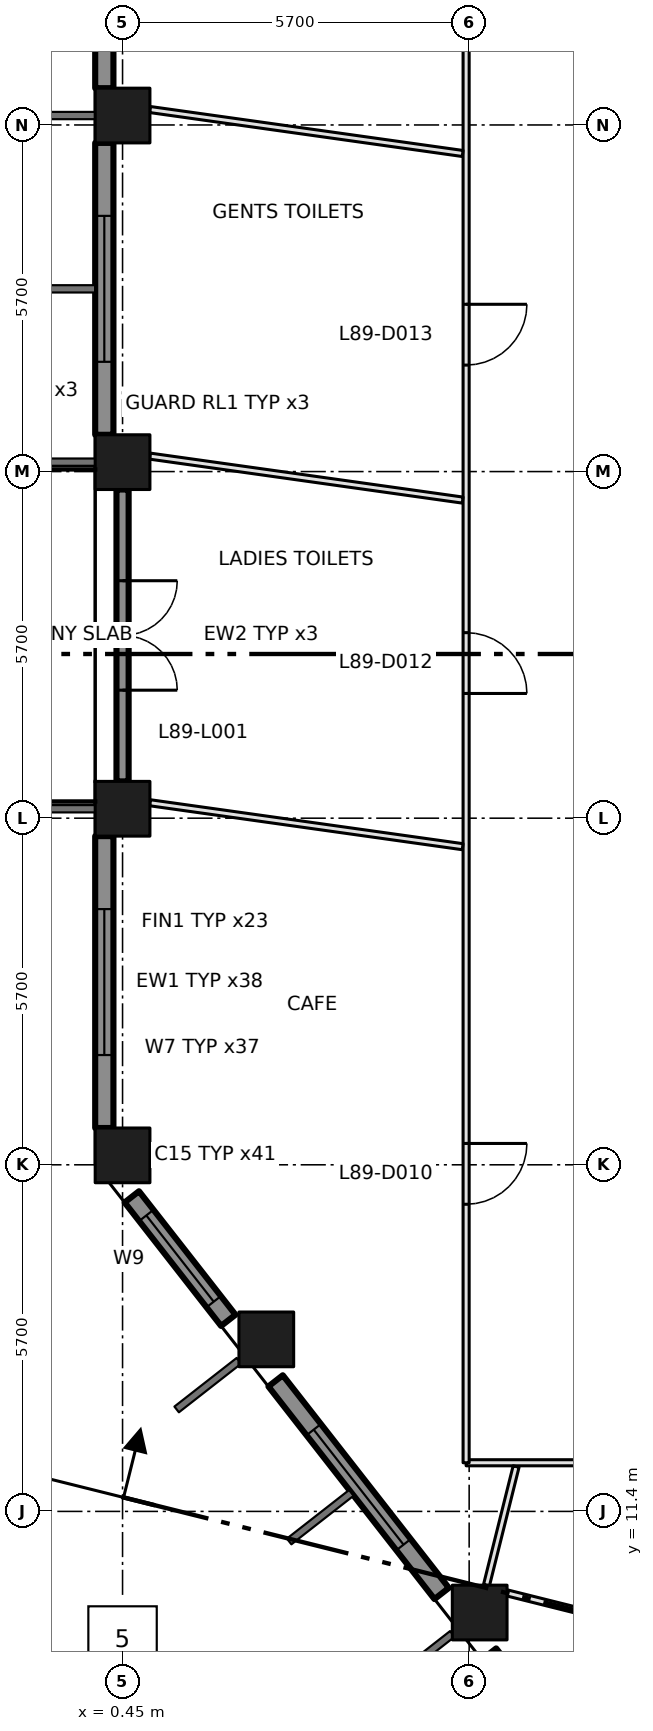
"""IFC4 building model, lengths in metres.
Left out: names, types, materials, properties, quantities, classifications, styles, units other than length and angle.
Written with IfcOpenShell. Run it as: python <this file> out.ifc"""

import sys

from ifc_helpers import new_model, si_unit, direction, frame, frame_2d, origin, origin_2d, place, context, subcontext, project, spatial, rectangle, extrude, element, fill, save


model = new_model("IFC4")
c1 = context("Model", 3, precision=1e-05, world=origin(), true_north=direction((0.0, 1.0)))
c2 = subcontext(c1, "Body", "Model", "MODEL_VIEW")
j1 = project(units=[si_unit("LENGTHUNIT", "METRE"), si_unit("PLANEANGLEUNIT", "RADIAN")], contexts=[c1])
p1 = place(None, origin())
s1 = spatial("IfcSite", under=j1, at=p1, CompositionType="ELEMENT")
p2 = place(p1, origin())
s2 = spatial("IfcBuilding", under=s1, at=p2, CompositionType="ELEMENT")
p3 = place(p2, frame((0.0, 0.0, 387.6)))
s3 = spatial("IfcBuildingStorey", under=s2, at=p3, CompositionType="ELEMENT", Elevation=387.6)
for number, where, z_axis, x_axis in (
    (1, (0.45, 17.255, 0.0), (0.0, 0.0, 1.0), (1.0, 0.0, 0.0)),
    (2, (0.45, 22.955, 0.0), (0.0, 0.0, 1.0), (1.0, 0.0, 0.0)),
    (3, (0.45, 28.655, 0.0), (0.0, 0.0, 1.0), (1.0, 0.0, 0.0)),
    (4, (0.45, 34.355, 0.0), (0.0, 0.0, 1.0), (1.0, 0.0, 0.0)),
    (5, (6.323, 9.737, 0.0), (0.0, 0.0, 1.0), (1.0, 0.0, 0.0)),
    (6, (2.814, 14.229, 0.0), (0.0, 0.0, 1.0), (1.0, 0.0, 0.0)),
):
    element("IfcColumn", number, at=place(p3, frame(where, z_axis=z_axis, x_axis=x_axis)), inside=s3, PredefinedType="COLUMN", context=c2, shape_type="SweptSolid", body=[
        extrude(rectangle(XDim=0.9, YDim=0.9, at=origin_2d()), origin(), (0.0, 0.0, 1.0), 4.2),
    ])
p4 = place(p3, frame((0.15, 39.605, 0.0), z_axis=(0.0, 0.0, 1.0), x_axis=(0.0, -1.0, 0.0)))
e7 = element("IfcWall", 7, at=p4, inside=s3, PredefinedType="SOLIDWALL", context=c2, shape_type="SweptSolid", body=[
    extrude(rectangle(XDim=4.8, YDim=0.3, at=frame_2d((2.4, 0.0))), origin(), (0.0, 0.0, 1.0), 3.2),
])
p5 = place(p4, frame((1.2, 0.0, 0.8)))
e8 = element("IfcOpeningElement", 8, at=p5, cuts=e7, PredefinedType="OPENING", context=c2, shape_type="SweptSolid", body=[
    extrude(rectangle(XDim=2.4, YDim=2.1, at=frame_2d((1.2, 1.05))), frame((0.0, 0.16, 0.0), z_axis=(0.0, -1.0, 0.0), x_axis=(1.0, 0.0, 0.0)), (0.0, 0.0, 1.0), 0.32),
])
p6 = place(p3, frame((0.15, 33.905, 0.0), z_axis=(0.0, 0.0, 1.0), x_axis=(0.0, -1.0, 0.0)))
e9 = element("IfcWall", 9, at=p6, inside=s3, PredefinedType="SOLIDWALL", context=c2, shape_type="SweptSolid", body=[
    extrude(rectangle(XDim=4.8, YDim=0.3, at=frame_2d((2.4, 0.0))), origin(), (0.0, 0.0, 1.0), 3.2),
])
p7 = place(p6, frame((1.2, 0.0, 0.8)))
e10 = element("IfcOpeningElement", 10, at=p7, cuts=e9, PredefinedType="OPENING", context=c2, shape_type="SweptSolid", body=[
    extrude(rectangle(XDim=2.4, YDim=2.1, at=frame_2d((1.2, 1.05))), frame((0.0, 0.16, 0.0), z_axis=(0.0, -1.0, 0.0), x_axis=(1.0, 0.0, 0.0)), (0.0, 0.0, 1.0), 0.32),
])
p8 = place(p3, frame((0.45, 28.205, 0.0), z_axis=(0.0, 0.0, 1.0), x_axis=(0.0, -1.0, 0.0)))
e11 = element("IfcWall", 11, at=p8, inside=s3, PredefinedType="SOLIDWALL", context=c2, shape_type="SweptSolid", body=[
    extrude(rectangle(XDim=4.8, YDim=0.2, at=frame_2d((2.4, 0.0))), origin(), (0.0, 0.0, 1.0), 3.2),
])
p9 = place(p8, frame((1.5, 0.0, 0.0)))
e12 = element("IfcOpeningElement", 12, at=p9, cuts=e11, PredefinedType="OPENING", context=c2, shape_type="SweptSolid", body=[
    extrude(rectangle(XDim=1.8, YDim=2.9, at=frame_2d((0.9, 1.45))), frame((0.0, 0.11, 0.0), z_axis=(0.0, -1.0, 0.0), x_axis=(1.0, 0.0, 0.0)), (0.0, 0.0, 1.0), 0.22),
])
p10 = place(p3, frame((-0.88, 28.485, 0.0), z_axis=(0.0, 0.0, 1.0), x_axis=(0.0, -1.0, 0.0)))
e13 = element("IfcWall", 13, at=p10, inside=s3, PredefinedType="SOLIDWALL", context=c2, shape_type="SweptSolid", body=[
    extrude(rectangle(XDim=5.36, YDim=0.4, at=frame_2d((2.68, 0.0))), origin(), (0.0, 0.0, 1.0), 0.3),
])
p11 = place(p3, frame((0.15, 22.505, 0.0), z_axis=(0.0, 0.0, 1.0), x_axis=(0.0, -1.0, 0.0)))
e14 = element("IfcWall", 14, at=p11, inside=s3, PredefinedType="SOLIDWALL", context=c2, shape_type="SweptSolid", body=[
    extrude(rectangle(XDim=4.8, YDim=0.3, at=frame_2d((2.4, 0.0))), origin(), (0.0, 0.0, 1.0), 3.2),
])
p12 = place(p11, frame((1.2, 0.0, 0.8)))
e15 = element("IfcOpeningElement", 15, at=p12, cuts=e14, PredefinedType="OPENING", context=c2, shape_type="SweptSolid", body=[
    extrude(rectangle(XDim=2.4, YDim=2.1, at=frame_2d((1.2, 1.05))), frame((0.0, 0.16, 0.0), z_axis=(0.0, -1.0, 0.0), x_axis=(1.0, 0.0, 0.0)), (0.0, 0.0, 1.0), 0.32),
])
p13 = place(p3, frame((0.602, 16.573, 0.0), z_axis=(0.0, 0.0, 1.0), x_axis=(0.61568999437, -0.787988471256, 0.0)))
e16 = element("IfcWall", 16, at=p13, inside=s3, PredefinedType="SOLIDWALL", context=c2, shape_type="SweptSolid", body=[
    extrude(rectangle(XDim=2.577, YDim=0.3, at=frame_2d((1.289, 0.0))), origin(), (0.0, 0.0, 1.0), 3.2),
])
p14 = place(p13, frame((0.388, 0.0, 0.8)))
e17 = element("IfcOpeningElement", 17, at=p14, cuts=e16, PredefinedType="OPENING", context=c2, shape_type="SweptSolid", body=[
    extrude(rectangle(XDim=1.8, YDim=2.1, at=frame_2d((0.9, 1.05))), frame((0.0, 0.16, 0.0), z_axis=(0.0, -1.0, 0.0), x_axis=(1.0, 0.0, 0.0)), (0.0, 0.0, 1.0), 0.32),
])
p15 = place(p3, frame((2.967, 13.547, 0.0), z_axis=(0.0, 0.0, 1.0), x_axis=(0.615486001463, -0.788147817356, 0.0)))
e18 = element("IfcWall", 18, at=p15, inside=s3, PredefinedType="SOLIDWALL", context=c2, shape_type="SweptSolid", body=[
    extrude(rectangle(XDim=4.437, YDim=0.3, at=frame_2d((2.219, 0.0))), origin(), (0.0, 0.0, 1.0), 3.2),
])
p16 = place(p15, frame((1.018, 0.0, 0.8)))
e19 = element("IfcOpeningElement", 19, at=p16, cuts=e18, PredefinedType="OPENING", context=c2, shape_type="SweptSolid", body=[
    extrude(rectangle(XDim=2.4, YDim=2.1, at=frame_2d((1.2, 1.05))), frame((0.0, 0.16, 0.0), z_axis=(0.0, -1.0, 0.0), x_axis=(1.0, 0.0, 0.0)), (0.0, 0.0, 1.0), 0.32),
])
p17 = place(p3, frame((6.476, 9.055, 0.0), z_axis=(0.0, 0.0, 1.0), x_axis=(0.615649380255, -0.788020203162, 0.0)))
e20 = element("IfcWall", 20, at=p17, inside=s3, PredefinedType="SOLIDWALL", context=c2, shape_type="SweptSolid", body=[
    extrude(rectangle(XDim=4.438, YDim=0.3, at=frame_2d((2.219, 0.0))), origin(), (0.0, 0.0, 1.0), 3.2),
])
p18 = place(p17, frame((1.019, 0.0, 0.8)))
e21 = element("IfcOpeningElement", 21, at=p18, cuts=e20, PredefinedType="OPENING", context=c2, shape_type="SweptSolid", body=[
    extrude(rectangle(XDim=2.4, YDim=2.1, at=frame_2d((1.2, 1.05))), frame((0.0, 0.16, 0.0), z_axis=(0.0, -1.0, 0.0), x_axis=(1.0, 0.0, 0.0)), (0.0, 0.0, 1.0), 0.32),
])
p19 = place(p3, frame((6.1, 12.2, 0.0), z_axis=(0.0, 0.0, 1.0), x_axis=(1.0, 0.0, 0.0)))
e22 = element("IfcWall", 22, at=p19, inside=s3, PredefinedType="PARTITIONING", context=c2, shape_type="SweptSolid", body=[
    extrude(rectangle(XDim=3.8, YDim=0.1, at=frame_2d((1.9, 0.0))), origin(), (0.0, 0.0, 1.0), 3.9),
])
p20 = place(p3, frame((6.1, 38.9, 0.0), z_axis=(0.0, 0.0, 1.0), x_axis=(0.0, -1.0, 0.0)))
e23 = element("IfcWall", 23, at=p20, inside=s3, PredefinedType="PARTITIONING", context=c2, shape_type="SweptSolid", body=[
    extrude(rectangle(XDim=26.7, YDim=0.1, at=frame_2d((13.35, 0.0))), origin(), (0.0, 0.0, 1.0), 3.9),
])
p21 = place(p20, frame((21.449, 0.0, 0.0)))
e24 = element("IfcOpeningElement", 24, at=p21, cuts=e23, PredefinedType="OPENING", context=c2, shape_type="SweptSolid", body=[
    extrude(rectangle(XDim=1.0, YDim=2.1, at=frame_2d((0.5, 1.05))), frame((0.0, 0.06, 0.0), z_axis=(0.0, -1.0, 0.0), x_axis=(1.0, 0.0, 0.0)), (0.0, 0.0, 1.0), 0.12),
])
p22 = place(p20, frame((13.049, 0.0, 0.0)))
e25 = element("IfcOpeningElement", 25, at=p22, cuts=e23, PredefinedType="OPENING", context=c2, shape_type="SweptSolid", body=[
    extrude(rectangle(XDim=1.0, YDim=2.1, at=frame_2d((0.5, 1.05))), frame((0.0, 0.06, 0.0), z_axis=(0.0, -1.0, 0.0), x_axis=(1.0, 0.0, 0.0)), (0.0, 0.0, 1.0), 0.12),
])
p23 = place(p20, frame((7.649, 0.0, 0.0)))
e26 = element("IfcOpeningElement", 26, at=p23, cuts=e23, PredefinedType="OPENING", context=c2, shape_type="SweptSolid", body=[
    extrude(rectangle(XDim=1.0, YDim=2.1, at=frame_2d((0.5, 1.05))), frame((0.0, 0.06, 0.0), z_axis=(0.0, -1.0, 0.0), x_axis=(1.0, 0.0, 0.0)), (0.0, 0.0, 1.0), 0.12),
])
p24 = place(p20, frame((2.08, 0.0, 0.0)))
e27 = element("IfcOpeningElement", 27, at=p24, cuts=e23, PredefinedType="OPENING", context=c2, shape_type="SweptSolid", body=[
    extrude(rectangle(XDim=1.0, YDim=2.1, at=frame_2d((0.5, 1.05))), frame((0.0, 0.06, 0.0), z_axis=(0.0, -1.0, 0.0), x_axis=(1.0, 0.0, 0.0)), (0.0, 0.0, 1.0), 0.12),
])
for number, where, z_axis, x_axis in (
    (28, (6.043, 22.331, 0.0), (0.0, 0.0, 1.0), (-0.99, 0.139, 0.0)),
    (29, (6.043, 28.031, 0.0), (0.0, 0.0, 1.0), (-0.99, 0.139, 0.0)),
    (30, (6.043, 33.731, 0.0), (0.0, 0.0, 1.0), (-0.99, 0.139, 0.0)),
):
    element("IfcWall", number, at=place(p3, frame(where, z_axis=z_axis, x_axis=x_axis)), inside=s3, PredefinedType="PARTITIONING", context=c2, shape_type="SweptSolid", body=[
        extrude(rectangle(XDim=5.194, YDim=0.1, at=frame_2d((2.597, 0.0))), origin(), (0.0, 0.0, 1.0), 3.9),
    ])
p25 = place(p3, frame((6.922, 12.138, 0.0), z_axis=(0.0, 0.0, 1.0), x_axis=(-0.24222136375, -0.97022101139, 0.0)))
e31 = element("IfcWall", 31, at=p25, inside=s3, PredefinedType="PARTITIONING", context=c2, shape_type="SweptSolid", body=[
    extrude(rectangle(XDim=2.011, YDim=0.1, at=frame_2d((1.005, 0.0))), origin(), (0.0, 0.0, 1.0), 3.9),
])
p26 = place(p3, frame((8.72, 9.574, 0.0), z_axis=(0.0, 0.0, 1.0), x_axis=(-0.970221168815, 0.24222073318, 0.0)))
e32 = element("IfcWall", 32, at=p26, inside=s3, PredefinedType="PARTITIONING", context=c2, shape_type="SweptSolid", body=[
    extrude(rectangle(XDim=2.007, YDim=0.1, at=frame_2d((1.003, 0.0))), origin(), (0.0, 0.0, 1.0), 3.9),
])
p27 = place(p7, origin())
e33 = element("IfcWindow", 33, at=p27, inside=s3, PartitioningType="DOUBLE_PANEL_VERTICAL", PredefinedType="WINDOW", context=c2, shape_type="SweptSolid", body=[
    extrude(rectangle(XDim=2.4, YDim=2.1, at=frame_2d((1.2, 1.05))), frame((0.0, 0.03, 0.0), z_axis=(0.0, -1.0, 0.0), x_axis=(1.0, 0.0, 0.0)), (0.0, 0.0, 1.0), 0.06),
])
fill(e10, e33)
p28 = place(p9, origin())
e34 = element("IfcDoor", 34, at=p28, inside=s3, OperationType="DOUBLE_DOOR_SINGLE_SWING", PredefinedType="DOOR", context=c2, shape_type="SweptSolid", body=[
    extrude(rectangle(XDim=1.8, YDim=2.9, at=frame_2d((0.9, 1.45))), frame((0.0, 0.025, 0.0), z_axis=(0.0, -1.0, 0.0), x_axis=(1.0, 0.0, 0.0)), (0.0, 0.0, 1.0), 0.05),
])
fill(e12, e34)
p29 = place(p12, origin())
e35 = element("IfcWindow", 35, at=p29, inside=s3, PartitioningType="DOUBLE_PANEL_VERTICAL", PredefinedType="WINDOW", context=c2, shape_type="SweptSolid", body=[
    extrude(rectangle(XDim=2.4, YDim=2.1, at=frame_2d((1.2, 1.05))), frame((0.0, 0.03, 0.0), z_axis=(0.0, -1.0, 0.0), x_axis=(1.0, 0.0, 0.0)), (0.0, 0.0, 1.0), 0.06),
])
fill(e15, e35)
p30 = place(p14, origin())
e36 = element("IfcWindow", 36, at=p30, inside=s3, PartitioningType="DOUBLE_PANEL_VERTICAL", PredefinedType="WINDOW", context=c2, shape_type="SweptSolid", body=[
    extrude(rectangle(XDim=1.8, YDim=2.1, at=frame_2d((0.9, 1.05))), frame((0.0, 0.03, 0.0), z_axis=(0.0, -1.0, 0.0), x_axis=(1.0, 0.0, 0.0)), (0.0, 0.0, 1.0), 0.06),
])
fill(e17, e36)
p31 = place(p16, origin())
e37 = element("IfcWindow", 37, at=p31, inside=s3, PartitioningType="DOUBLE_PANEL_VERTICAL", PredefinedType="WINDOW", context=c2, shape_type="SweptSolid", body=[
    extrude(rectangle(XDim=2.4, YDim=2.1, at=frame_2d((1.2, 1.05))), frame((0.0, 0.03, 0.0), z_axis=(0.0, -1.0, 0.0), x_axis=(1.0, 0.0, 0.0)), (0.0, 0.0, 1.0), 0.06),
])
fill(e19, e37)
p32 = place(p21, origin())
e38 = element("IfcDoor", 38, at=p32, inside=s3, OperationType="SINGLE_SWING_LEFT", PredefinedType="DOOR", context=c2, shape_type="SweptSolid", body=[
    extrude(rectangle(XDim=1.0, YDim=2.1, at=frame_2d((0.5, 1.05))), frame((0.0, 0.025, 0.0), z_axis=(0.0, -1.0, 0.0), x_axis=(1.0, 0.0, 0.0)), (0.0, 0.0, 1.0), 0.05),
])
fill(e24, e38)
p33 = place(p22, origin())
e39 = element("IfcDoor", 39, at=p33, inside=s3, OperationType="SINGLE_SWING_RIGHT", PredefinedType="DOOR", context=c2, shape_type="SweptSolid", body=[
    extrude(rectangle(XDim=1.0, YDim=2.1, at=frame_2d((0.5, 1.05))), frame((0.0, 0.025, 0.0), z_axis=(0.0, -1.0, 0.0), x_axis=(1.0, 0.0, 0.0)), (0.0, 0.0, 1.0), 0.05),
])
fill(e25, e39)
p34 = place(p23, origin())
e40 = element("IfcDoor", 40, at=p34, inside=s3, OperationType="SINGLE_SWING_LEFT", PredefinedType="DOOR", context=c2, shape_type="SweptSolid", body=[
    extrude(rectangle(XDim=1.0, YDim=2.1, at=frame_2d((0.5, 1.05))), frame((0.0, 0.025, 0.0), z_axis=(0.0, -1.0, 0.0), x_axis=(1.0, 0.0, 0.0)), (0.0, 0.0, 1.0), 0.05),
])
fill(e26, e40)
save(model, sys.argv[1])
